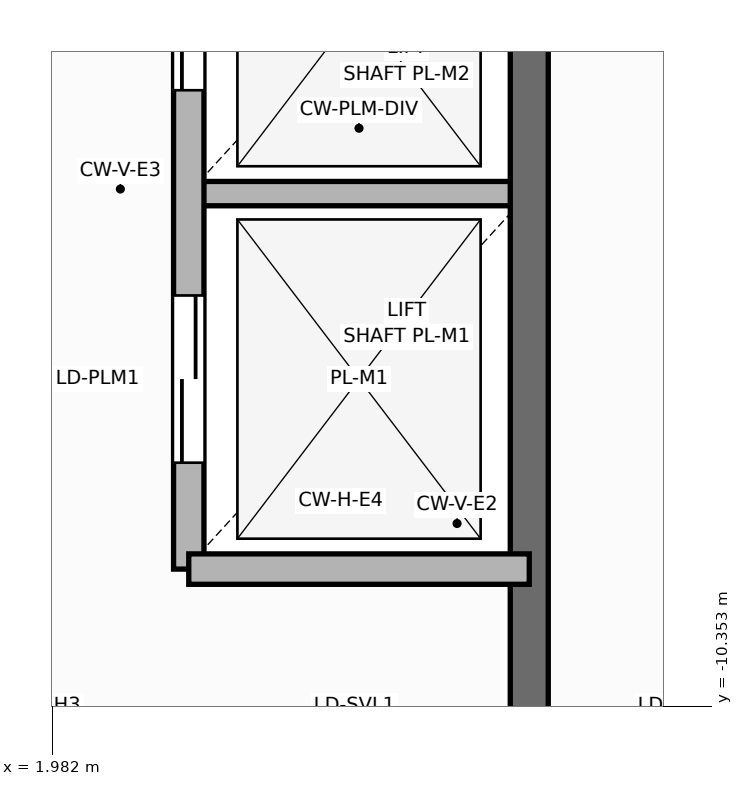
"""IFC4 building model, lengths in metres.
Left out: names, types, materials, properties, quantities, classifications, styles, units other than length and angle.
Written with IfcOpenShell. Run it as: python <this file> out.ifc"""

import sys

from ifc_helpers import new_model, si_unit, direction, frame, frame_2d, origin, place, context, subcontext, project, spatial, rectangle, extrude, element, fill, save


model = new_model("IFC4")
c1 = context("Model", 3, precision=1e-05, world=origin(), true_north=direction((0.0, 1.0)))
c2 = subcontext(c1, "Body", "Model", "MODEL_VIEW")
j1 = project(units=[si_unit("LENGTHUNIT", "METRE"), si_unit("PLANEANGLEUNIT", "RADIAN")], contexts=[c1])
p1 = place(None, origin())
s1 = spatial("IfcSite", under=j1, at=p1, CompositionType="ELEMENT")
p2 = place(p1, origin())
s2 = spatial("IfcBuilding", under=s1, at=p2, CompositionType="ELEMENT")
p3 = place(p2, frame((0.0, 0.0, 99.6)))
s3 = spatial("IfcBuildingStorey", under=s2, at=p3, CompositionType="ELEMENT", Elevation=99.6)
p4 = place(p3, frame((2.88, -6.98, 0.0), z_axis=(0.0, 0.0, 1.0), x_axis=(1.0, 0.0, 0.0)))
e1 = element("IfcWall", 1, at=p4, inside=s3, PredefinedType="PARTITIONING", context=c2, shape_type="SweptSolid", body=[
    extrude(rectangle(XDim=2.24, YDim=0.16, at=frame_2d((1.12, 0.0))), origin(), (0.0, 0.0, 1.0), 3.35),
])
p5 = place(p3, frame((5.12, -13.85, 0.0), z_axis=(0.0, 0.0, 1.0), x_axis=(0.0, 1.0, 0.0)))
e2 = element("IfcWall", 2, at=p5, inside=s3, PredefinedType="SHEAR", context=c2, shape_type="SweptSolid", body=[
    extrude(rectangle(XDim=9.4, YDim=0.25, at=frame_2d((4.7, 0.0))), origin(), (0.0, 0.0, 1.0), 3.6),
])
p6 = place(p3, frame((2.88, -9.45, 0.0), z_axis=(0.0, 0.0, 1.0), x_axis=(0.0, 1.0, 0.0)))
e3 = element("IfcWall", 3, at=p6, inside=s3, PredefinedType="SOLIDWALL", context=c2, shape_type="SweptSolid", body=[
    extrude(rectangle(XDim=5.0, YDim=0.2, at=frame_2d((2.5, 0.0))), origin(), (0.0, 0.0, 1.0), 3.35),
])
p7 = place(p6, frame((0.7, 0.0, 0.0)))
e4 = element("IfcOpeningElement", 4, at=p7, cuts=e3, PredefinedType="OPENING", context=c2, shape_type="SweptSolid", body=[
    extrude(rectangle(XDim=1.106, YDim=2.104, at=frame_2d((0.55, 1.052))), frame((0.0, 0.11, 0.0), z_axis=(0.0, -1.0, 0.0), x_axis=(1.0, 0.0, 0.0)), (0.0, 0.0, 1.0), 0.22),
])
p8 = place(p6, frame((3.15, 0.0, 0.0)))
e5 = element("IfcOpeningElement", 5, at=p8, cuts=e3, PredefinedType="OPENING", context=c2, shape_type="SweptSolid", body=[
    extrude(rectangle(XDim=1.106, YDim=2.104, at=frame_2d((0.55, 1.052))), frame((0.0, 0.11, 0.0), z_axis=(0.0, -1.0, 0.0), x_axis=(1.0, 0.0, 0.0)), (0.0, 0.0, 1.0), 0.22),
])
p9 = place(p3, frame((2.88, -9.45, 0.0), z_axis=(0.0, 0.0, 1.0), x_axis=(1.0, 0.0, 0.0)))
e6 = element("IfcWall", 6, at=p9, inside=s3, PredefinedType="SOLIDWALL", context=c2, shape_type="SweptSolid", body=[
    extrude(rectangle(XDim=2.24, YDim=0.2, at=frame_2d((1.12, 0.0))), origin(), (0.0, 0.0, 1.0), 3.35),
])
p10 = place(p7, origin())
e7 = element("IfcDoor", 7, at=p10, inside=s3, OperationType="DOUBLE_DOOR_SLIDING", PredefinedType="DOOR", context=c2, shape_type="SweptSolid", body=[
    extrude(rectangle(XDim=1.1, YDim=2.1, at=frame_2d((0.55, 1.05))), frame((0.0, 0.025, 0.0), z_axis=(0.0, -1.0, 0.0), x_axis=(1.0, 0.0, 0.0)), (0.0, 0.0, 1.0), 0.05),
])
fill(e4, e7)
p11 = place(p8, origin())
e8 = element("IfcDoor", 8, at=p11, inside=s3, OperationType="DOUBLE_DOOR_SLIDING", PredefinedType="DOOR", context=c2, shape_type="SweptSolid", body=[
    extrude(rectangle(XDim=1.1, YDim=2.1, at=frame_2d((0.55, 1.05))), frame((0.0, 0.025, 0.0), z_axis=(0.0, -1.0, 0.0), x_axis=(1.0, 0.0, 0.0)), (0.0, 0.0, 1.0), 0.05),
])
fill(e5, e8)
save(model, sys.argv[1])
